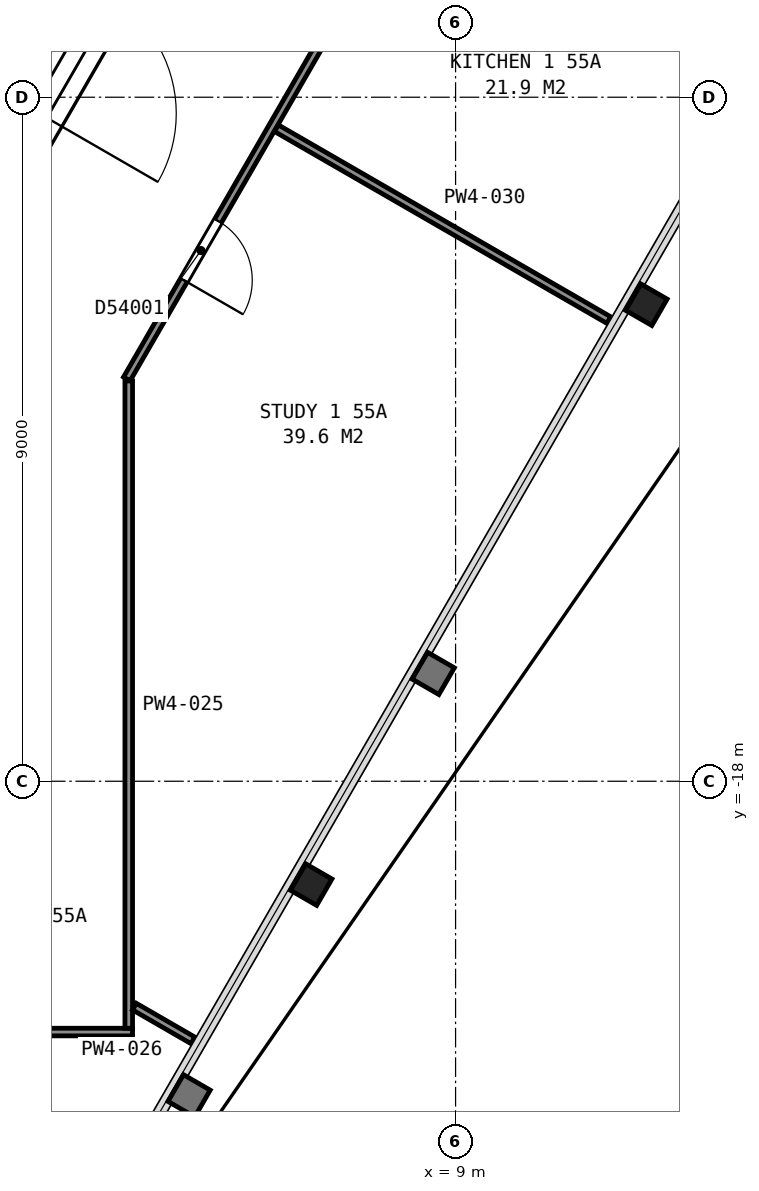
"""IFC4 building model, lengths in metres.
Left out: names, types, materials, properties, quantities, classifications, styles, units other than length and angle.
Written with IfcOpenShell. Run it as: python <this file> out.ifc"""

import sys

from ifc_helpers import new_model, si_unit, direction, frame, frame_2d, origin, origin_2d, place, context, subcontext, project, spatial, rectangle, i_section, extrude, element, fill, save


model = new_model("IFC4")
c1 = context("Model", 3, precision=1e-05, world=origin(), true_north=direction((0.0, 1.0)))
c2 = subcontext(c1, "Body", "Model", "MODEL_VIEW")
j1 = project(units=[si_unit("LENGTHUNIT", "METRE"), si_unit("PLANEANGLEUNIT", "RADIAN")], contexts=[c1])
p1 = place(None, origin())
s1 = spatial("IfcSite", under=j1, at=p1, CompositionType="ELEMENT")
p2 = place(p1, origin())
s2 = spatial("IfcBuilding", under=s1, at=p2, CompositionType="ELEMENT")
p3 = place(p2, frame((0.0, 0.0, 221.2)))
s3 = spatial("IfcBuildingStorey", under=s2, at=p3, CompositionType="ELEMENT", Elevation=221.2)
for number, where, z_axis, x_axis in (
    (1, (7.1, -19.36, 0.0), (0.0, 0.0, 1.0), (-0.5, -0.866, 0.0)),
    (2, (11.51, -11.73, 0.0), (0.0, 0.0, 1.0), (-0.5, -0.866, 0.0)),
):
    element("IfcColumn", number, at=place(p3, frame(where, z_axis=z_axis, x_axis=x_axis)), inside=s3, PredefinedType="COLUMN", context=c2, shape_type="SweptSolid", body=[
        extrude(i_section(OverallWidth=0.401, OverallDepth=0.399, WebThickness=0.025, FlangeThickness=0.04, FilletRadius=0.015, at=origin_2d()), origin(), (0.0, 0.0, 1.0), 3.7),
    ])
p4 = place(p3, frame((1.677, -12.415, 0.0), z_axis=(0.0, 0.0, 1.0), x_axis=(0.500054337157, 0.865994029939, 0.0)))
e3 = element("IfcWall", 3, at=p4, inside=s3, PredefinedType="PARTITIONING", context=c2, shape_type="SweptSolid", body=[
    extrude(rectangle(XDim=6.177, YDim=0.2, at=frame_2d((3.088, 0.0))), origin(), (0.0, 0.0, 1.0), 3.45),
])
p5 = place(p4, frame((3.695, 0.0, 0.0)))
e4 = element("IfcOpeningElement", 4, at=p5, cuts=e3, PredefinedType="OPENING", context=c2, shape_type="SweptSolid", body=[
    extrude(rectangle(XDim=1.8, YDim=2.1, at=frame_2d((0.9, 1.05))), frame((0.0, 0.11, 0.0), z_axis=(0.0, -1.0, 0.0), x_axis=(1.0, 0.0, 0.0)), (0.0, 0.0, 1.0), 0.22),
])
p6 = place(p3, frame((4.75, -21.3, 0.0), z_axis=(0.0, 0.0, 1.0), x_axis=(-1.0, 0.0, 0.0)))
e5 = element("IfcWall", 5, at=p6, inside=s3, PredefinedType="PARTITIONING", context=c2, shape_type="SweptSolid", body=[
    extrude(rectangle(XDim=9.5, YDim=0.1, at=frame_2d((4.75, 0.0))), origin(), (0.0, 0.0, 1.0), 2.713),
])
p7 = place(p6, frame((4.15, 0.0, 0.0)))
e6 = element("IfcOpeningElement", 6, at=p7, cuts=e5, PredefinedType="OPENING", context=c2, shape_type="SweptSolid", body=[
    extrude(rectangle(XDim=1.2, YDim=2.1, at=frame_2d((0.6, 1.05))), frame((0.0, 0.06, 0.0), z_axis=(0.0, -1.0, 0.0), x_axis=(1.0, 0.0, 0.0)), (0.0, 0.0, 1.0), 0.12),
])
p8 = place(p3, frame((4.7, -21.25, 0.0), z_axis=(0.0, 0.0, 1.0), x_axis=(0.0, 1.0, 0.0)))
e7 = element("IfcWall", 7, at=p8, inside=s3, PredefinedType="PARTITIONING", context=c2, shape_type="SweptSolid", body=[
    extrude(rectangle(XDim=8.517, YDim=0.1, at=frame_2d((4.259, 0.0))), origin(), (0.0, 0.0, 1.0), 2.713),
])
p9 = place(p3, frame((4.775, -20.965, 0.0), z_axis=(0.0, 0.0, 1.0), x_axis=(0.866103179807, -0.499865263774, 0.0)))
e8 = element("IfcWall", 8, at=p9, inside=s3, PredefinedType="PARTITIONING", context=c2, shape_type="SweptSolid", body=[
    extrude(rectangle(XDim=0.888, YDim=0.1, at=frame_2d((0.444, 0.0))), origin(), (0.0, 0.0, 1.0), 2.713),
])
p10 = place(p3, frame((13.342, 2.306, 0.0), z_axis=(0.0, 0.0, 1.0), x_axis=(-0.49997440863, -0.866040178465, 0.0)))
e9 = element("IfcWall", 9, at=p10, inside=s3, PredefinedType="PARTITIONING", context=c2, shape_type="SweptSolid", body=[
    extrude(rectangle(XDim=17.335, YDim=0.1, at=frame_2d((8.667, 0.0))), origin(), (0.0, 0.0, 1.0), 2.713),
])
p11 = place(p10, frame((14.935, 0.0, 0.0)))
e10 = element("IfcOpeningElement", 10, at=p11, cuts=e9, PredefinedType="OPENING", context=c2, shape_type="SweptSolid", body=[
    extrude(rectangle(XDim=0.9, YDim=2.1, at=frame_2d((0.45, 1.05))), frame((0.0, 0.06, 0.0), z_axis=(0.0, -1.0, 0.0), x_axis=(1.0, 0.0, 0.0)), (0.0, 0.0, 1.0), 0.12),
])
p12 = place(p10, frame((10.794, 0.0, 0.0)))
e11 = element("IfcOpeningElement", 11, at=p12, cuts=e9, PredefinedType="OPENING", context=c2, shape_type="SweptSolid", body=[
    extrude(rectangle(XDim=0.9, YDim=2.1, at=frame_2d((0.45, 1.05))), frame((0.0, 0.06, 0.0), z_axis=(0.0, -1.0, 0.0), x_axis=(1.0, 0.0, 0.0)), (0.0, 0.0, 1.0), 0.12),
])
p13 = place(p10, frame((5.866, 0.0, 0.0)))
e12 = element("IfcOpeningElement", 12, at=p13, cuts=e9, PredefinedType="OPENING", context=c2, shape_type="SweptSolid", body=[
    extrude(rectangle(XDim=0.9, YDim=2.1, at=frame_2d((0.45, 1.05))), frame((0.0, 0.06, 0.0), z_axis=(0.0, -1.0, 0.0), x_axis=(1.0, 0.0, 0.0)), (0.0, 0.0, 1.0), 0.12),
])
p14 = place(p10, frame((1.395, 0.0, 0.0)))
e13 = element("IfcOpeningElement", 13, at=p14, cuts=e9, PredefinedType="OPENING", context=c2, shape_type="SweptSolid", body=[
    extrude(rectangle(XDim=0.9, YDim=2.1, at=frame_2d((0.45, 1.05))), frame((0.0, 0.06, 0.0), z_axis=(0.0, -1.0, 0.0), x_axis=(1.0, 0.0, 0.0)), (0.0, 0.0, 1.0), 0.12),
])
p15 = place(p3, frame((6.643, -9.407, 0.0), z_axis=(0.0, 0.0, 1.0), x_axis=(0.866056765328, -0.499945676278, 0.0)))
e14 = element("IfcWall", 14, at=p15, inside=s3, PredefinedType="PARTITIONING", context=c2, shape_type="SweptSolid", body=[
    extrude(rectangle(XDim=5.049, YDim=0.1, at=frame_2d((2.525, 0.0))), origin(), (0.0, 0.0, 1.0), 2.713),
])
p16 = place(p5, origin())
e15 = element("IfcDoor", 15, at=p16, inside=s3, OperationType="DOUBLE_DOOR_SINGLE_SWING", PredefinedType="DOOR", context=c2, shape_type="SweptSolid", body=[
    extrude(rectangle(XDim=1.8, YDim=2.1, at=frame_2d((0.9, 1.05))), frame((0.0, 0.025, 0.0), z_axis=(0.0, -1.0, 0.0), x_axis=(1.0, 0.0, 0.0)), (0.0, 0.0, 1.0), 0.05),
])
fill(e4, e15)
p17 = place(p11, origin())
e16 = element("IfcDoor", 16, at=p17, inside=s3, OperationType="SINGLE_SWING_RIGHT", PredefinedType="DOOR", context=c2, shape_type="SweptSolid", body=[
    extrude(rectangle(XDim=0.9, YDim=2.1, at=frame_2d((0.45, 1.05))), frame((0.0, 0.025, 0.0), z_axis=(0.0, -1.0, 0.0), x_axis=(1.0, 0.0, 0.0)), (0.0, 0.0, 1.0), 0.05),
])
fill(e10, e16)
save(model, sys.argv[1])
